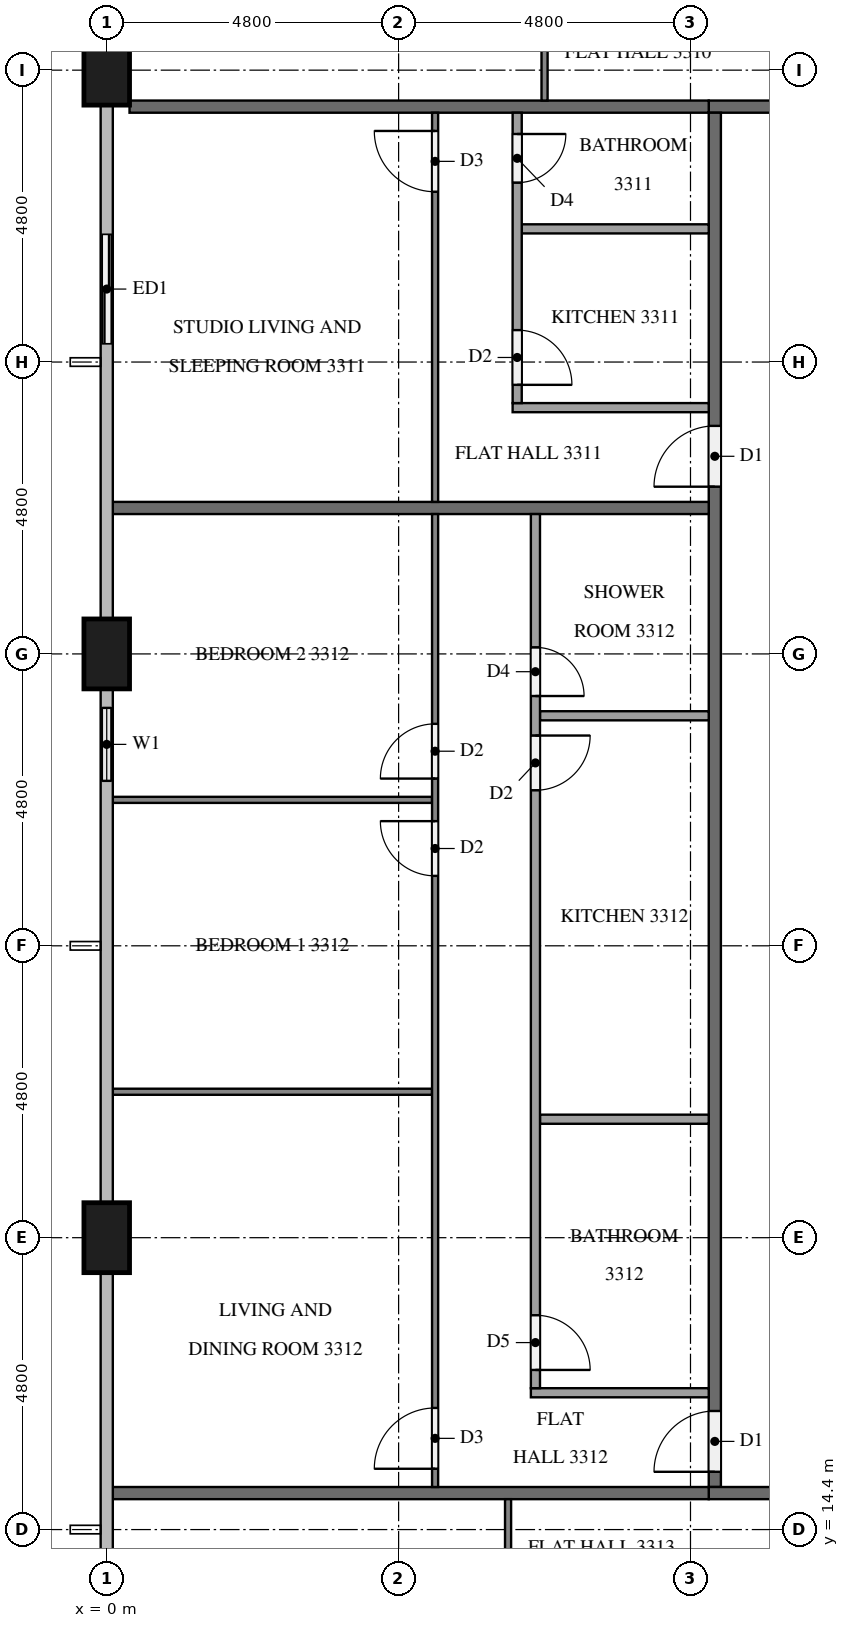
"""IFC4 building model, lengths in metres.
Left out: names, types, materials, properties, quantities, classifications, styles, units other than length and angle.
Written with IfcOpenShell. Run it as: python <this file> out.ifc"""

import sys

from ifc_helpers import new_model, si_unit, direction, frame, frame_2d, origin, origin_2d, place, context, subcontext, project, spatial, rectangle, extrude, element, fill, save


model = new_model("IFC4")
c1 = context("Model", 3, precision=1e-05, world=origin(), true_north=direction((0.0, 1.0)))
c2 = subcontext(c1, "Body", "Model", "MODEL_VIEW")
j1 = project(units=[si_unit("LENGTHUNIT", "METRE"), si_unit("PLANEANGLEUNIT", "RADIAN")], contexts=[c1])
p1 = place(None, origin())
s1 = spatial("IfcSite", under=j1, at=p1, CompositionType="ELEMENT")
p2 = place(p1, origin())
s2 = spatial("IfcBuilding", under=s1, at=p2, CompositionType="ELEMENT")
p3 = place(p2, frame((0.0, 0.0, 129.6)))
s3 = spatial("IfcBuildingStorey", under=s2, at=p3, CompositionType="ELEMENT", Elevation=129.6)
for number, where, z_axis, x_axis in (
    (1, (0.0, 38.4, 0.0), (0.0, 0.0, 1.0), (0.0, 1.0, 0.0)),
    (2, (0.0, 28.8, 0.0), (0.0, 0.0, 1.0), (0.0, 1.0, 0.0)),
    (3, (0.0, 19.2, 0.0), (0.0, 0.0, 1.0), (0.0, 1.0, 0.0)),
):
    element("IfcColumn", number, at=place(p3, frame(where, z_axis=z_axis, x_axis=x_axis)), inside=s3, PredefinedType="COLUMN", context=c2, shape_type="SweptSolid", body=[
        extrude(rectangle(XDim=1.15, YDim=0.75, at=origin_2d()), origin(), (0.0, 0.0, 1.0), 3.2),
    ])
p4 = place(p3, frame((0.0, 36.0, 0.0), z_axis=(0.0, 0.0, 1.0), x_axis=(0.0, -1.0, 0.0)))
e4 = element("IfcWall", 4, at=p4, inside=s3, PredefinedType="SOLIDWALL", context=c2, shape_type="SweptSolid", body=[
    extrude(rectangle(XDim=2.4, YDim=0.15, at=frame_2d((1.2, 0.0))), origin(), (0.0, 0.0, 1.0), 3.2),
])
p5 = place(p4, frame((0.3, 0.0, 0.0)))
e5 = element("IfcOpeningElement", 5, at=p5, cuts=e4, PredefinedType="OPENING", context=c2, shape_type="SweptSolid", body=[
    extrude(rectangle(XDim=1.8, YDim=2.4, at=frame_2d((0.9, 1.2))), frame((0.0, 0.085, 0.0), z_axis=(0.0, -1.0, 0.0), x_axis=(1.0, 0.0, 0.0)), (0.0, 0.0, 1.0), 0.17),
])
p6 = place(p3, frame((0.0, 28.225, 0.0), z_axis=(0.0, 0.0, 1.0), x_axis=(0.0, -1.0, 0.0)))
e6 = element("IfcWall", 6, at=p6, inside=s3, PredefinedType="SOLIDWALL", context=c2, shape_type="SweptSolid", body=[
    extrude(rectangle(XDim=1.825, YDim=0.15, at=frame_2d((0.913, 0.0))), origin(), (0.0, 0.0, 1.0), 3.2),
])
p7 = place(p6, frame((0.312, 0.0, 0.9)))
e7 = element("IfcOpeningElement", 7, at=p7, cuts=e6, PredefinedType="OPENING", context=c2, shape_type="SweptSolid", body=[
    extrude(rectangle(XDim=1.2, YDim=1.4, at=frame_2d((0.6, 0.7))), frame((0.0, 0.085, 0.0), z_axis=(0.0, -1.0, 0.0), x_axis=(1.0, 0.0, 0.0)), (0.0, 0.0, 1.0), 0.17),
])
p8 = place(p3, frame((12.1, 37.8, 0.0), z_axis=(0.0, 0.0, 1.0), x_axis=(-1.0, 0.0, 0.0)))
e8 = element("IfcWall", 8, at=p8, inside=s3, PredefinedType="PARTITIONING", context=c2, shape_type="SweptSolid", body=[
    extrude(rectangle(XDim=2.2, YDim=0.2, at=frame_2d((1.1, 0.0))), origin(), (0.0, 0.0, 1.0), 3.2),
])
p9 = place(p3, frame((10.0, 15.1, 0.0), z_axis=(0.0, 0.0, 1.0), x_axis=(0.0, 1.0, 0.0)))
e9 = element("IfcWall", 9, at=p9, inside=s3, PredefinedType="PARTITIONING", context=c2, shape_type="SweptSolid", body=[
    extrude(rectangle(XDim=22.6, YDim=0.2, at=frame_2d((11.3, 0.0))), origin(), (0.0, 0.0, 1.0), 3.2),
])
p10 = place(p9, frame((16.45, 0.0, 0.0)))
e10 = element("IfcOpeningElement", 10, at=p10, cuts=e9, PredefinedType="OPENING", context=c2, shape_type="SweptSolid", body=[
    extrude(rectangle(XDim=1.0, YDim=2.1, at=frame_2d((0.5, 1.05))), frame((0.0, 0.11, 0.0), z_axis=(0.0, -1.0, 0.0), x_axis=(1.0, 0.0, 0.0)), (0.0, 0.0, 1.0), 0.22),
])
p11 = place(p9, frame((0.25, 0.0, 0.0)))
e11 = element("IfcOpeningElement", 11, at=p11, cuts=e9, PredefinedType="OPENING", context=c2, shape_type="SweptSolid", body=[
    extrude(rectangle(XDim=1.0, YDim=2.1, at=frame_2d((0.5, 1.05))), frame((0.0, 0.11, 0.0), z_axis=(0.0, -1.0, 0.0), x_axis=(1.0, 0.0, 0.0)), (0.0, 0.0, 1.0), 0.22),
])
p12 = place(p3, frame((9.9, 15.0, 0.0), z_axis=(0.0, 0.0, 1.0), x_axis=(1.0, 0.0, 0.0)))
e12 = element("IfcWall", 12, at=p12, inside=s3, PredefinedType="PARTITIONING", context=c2, shape_type="SweptSolid", body=[
    extrude(rectangle(XDim=2.2, YDim=0.2, at=frame_2d((1.1, 0.0))), origin(), (0.0, 0.0, 1.0), 3.2),
])
p13 = place(p3, frame((0.375, 37.8, 0.0), z_axis=(0.0, 0.0, 1.0), x_axis=(1.0, 0.0, 0.0)))
e13 = element("IfcWall", 13, at=p13, inside=s3, PredefinedType="PARTITIONING", context=c2, shape_type="SweptSolid", body=[
    extrude(rectangle(XDim=9.525, YDim=0.2, at=frame_2d((4.762, 0.0))), origin(), (0.0, 0.0, 1.0), 3.2),
])
for number, where, z_axis, x_axis in (
    (14, (0.1, 31.2, 0.0), (0.0, 0.0, 1.0), (1.0, 0.0, 0.0)),
    (15, (0.1, 15.0, 0.0), (0.0, 0.0, 1.0), (1.0, 0.0, 0.0)),
):
    element("IfcWall", number, at=place(p3, frame(where, z_axis=z_axis, x_axis=x_axis)), inside=s3, PredefinedType="PARTITIONING", context=c2, shape_type="SweptSolid", body=[
        extrude(rectangle(XDim=9.8, YDim=0.2, at=frame_2d((4.9, 0.0))), origin(), (0.0, 0.0, 1.0), 3.2),
    ])
p14 = place(p3, frame((7.2, 37.9, 0.0), z_axis=(0.0, 0.0, 1.0), x_axis=(0.0, 1.0, 0.0)))
e16 = element("IfcWall", 16, at=p14, inside=s3, PredefinedType="PARTITIONING", context=c2, shape_type="SweptSolid", body=[
    extrude(rectangle(XDim=14.8, YDim=0.1, at=frame_2d((7.4, 0.0))), origin(), (0.0, 0.0, 1.0), 3.2),
])
p15 = place(p14, frame((4.05, 0.0, 0.0)))
e17 = element("IfcOpeningElement", 17, at=p15, cuts=e16, PredefinedType="OPENING", context=c2, shape_type="SweptSolid", body=[
    extrude(rectangle(XDim=0.9, YDim=2.1, at=frame_2d((0.45, 1.05))), frame((0.0, 0.06, 0.0), z_axis=(0.0, -1.0, 0.0), x_axis=(1.0, 0.0, 0.0)), (0.0, 0.0, 1.0), 0.12),
])
p16 = place(p14, frame((5.65, 0.0, 0.0)))
e18 = element("IfcOpeningElement", 18, at=p16, cuts=e16, PredefinedType="OPENING", context=c2, shape_type="SweptSolid", body=[
    extrude(rectangle(XDim=0.9, YDim=2.1, at=frame_2d((0.45, 1.05))), frame((0.0, 0.06, 0.0), z_axis=(0.0, -1.0, 0.0), x_axis=(1.0, 0.0, 0.0)), (0.0, 0.0, 1.0), 0.12),
])
p17 = place(p14, frame((13.5, 0.0, 0.0)))
e19 = element("IfcOpeningElement", 19, at=p17, cuts=e16, PredefinedType="OPENING", context=c2, shape_type="SweptSolid", body=[
    extrude(rectangle(XDim=1.0, YDim=2.1, at=frame_2d((0.5, 1.05))), frame((0.0, 0.06, 0.0), z_axis=(0.0, -1.0, 0.0), x_axis=(1.0, 0.0, 0.0)), (0.0, 0.0, 1.0), 0.12),
])
p18 = place(p3, frame((5.4, 31.3, 0.0), z_axis=(0.0, 0.0, 1.0), x_axis=(0.0, 1.0, 0.0)))
e20 = element("IfcWall", 20, at=p18, inside=s3, PredefinedType="PARTITIONING", context=c2, shape_type="SweptSolid", body=[
    extrude(rectangle(XDim=6.4, YDim=0.1, at=frame_2d((3.2, 0.0))), origin(), (0.0, 0.0, 1.0), 3.2),
])
p19 = place(p18, frame((5.1, 0.0, 0.0)))
e21 = element("IfcOpeningElement", 21, at=p19, cuts=e20, PredefinedType="OPENING", context=c2, shape_type="SweptSolid", body=[
    extrude(rectangle(XDim=1.0, YDim=2.1, at=frame_2d((0.5, 1.05))), frame((0.0, 0.06, 0.0), z_axis=(0.0, -1.0, 0.0), x_axis=(1.0, 0.0, 0.0)), (0.0, 0.0, 1.0), 0.12),
])
p20 = place(p3, frame((9.9, 35.79, 0.0), z_axis=(0.0, 0.0, 1.0), x_axis=(-1.0, 0.0, 0.0)))
e22 = element("IfcWall", 22, at=p20, inside=s3, PredefinedType="PARTITIONING", context=c2, shape_type="SweptSolid", body=[
    extrude(rectangle(XDim=3.075, YDim=0.15, at=frame_2d((1.538, 0.0))), origin(), (0.0, 0.0, 1.0), 3.2),
])
p21 = place(p3, frame((9.9, 32.85, 0.0), z_axis=(0.0, 0.0, 1.0), x_axis=(-1.0, 0.0, 0.0)))
e23 = element("IfcWall", 23, at=p21, inside=s3, PredefinedType="PARTITIONING", context=c2, shape_type="SweptSolid", body=[
    extrude(rectangle(XDim=3.225, YDim=0.15, at=frame_2d((1.612, 0.0))), origin(), (0.0, 0.0, 1.0), 3.2),
])
p22 = place(p3, frame((6.75, 37.7, 0.0), z_axis=(0.0, 0.0, 1.0), x_axis=(0.0, -1.0, 0.0)))
e24 = element("IfcWall", 24, at=p22, inside=s3, PredefinedType="PARTITIONING", context=c2, shape_type="SweptSolid", body=[
    extrude(rectangle(XDim=4.775, YDim=0.15, at=frame_2d((2.387, 0.0))), origin(), (0.0, 0.0, 1.0), 3.2),
])
p23 = place(p22, frame((3.575, 0.0, 0.0)))
e25 = element("IfcOpeningElement", 25, at=p23, cuts=e24, PredefinedType="OPENING", context=c2, shape_type="SweptSolid", body=[
    extrude(rectangle(XDim=0.9, YDim=2.1, at=frame_2d((0.45, 1.05))), frame((0.0, 0.085, 0.0), z_axis=(0.0, -1.0, 0.0), x_axis=(1.0, 0.0, 0.0)), (0.0, 0.0, 1.0), 0.17),
])
p24 = place(p22, frame((0.35, 0.0, 0.0)))
e26 = element("IfcOpeningElement", 26, at=p24, cuts=e24, PredefinedType="OPENING", context=c2, shape_type="SweptSolid", body=[
    extrude(rectangle(XDim=0.8, YDim=2.1, at=frame_2d((0.4, 1.05))), frame((0.0, 0.085, 0.0), z_axis=(0.0, -1.0, 0.0), x_axis=(1.0, 0.0, 0.0)), (0.0, 0.0, 1.0), 0.17),
])
for number, where, z_axis, x_axis in (
    (27, (5.35, 21.6, 0.0), (0.0, 0.0, 1.0), (-1.0, 0.0, 0.0)),
    (28, (5.35, 26.4, 0.0), (0.0, 0.0, 1.0), (-1.0, 0.0, 0.0)),
):
    element("IfcWall", number, at=place(p3, frame(where, z_axis=z_axis, x_axis=x_axis)), inside=s3, PredefinedType="PARTITIONING", context=c2, shape_type="SweptSolid", body=[
        extrude(rectangle(XDim=5.25, YDim=0.1, at=frame_2d((2.625, 0.0))), origin(), (0.0, 0.0, 1.0), 3.2),
    ])
p25 = place(p3, frame((5.4, 15.1, 0.0), z_axis=(0.0, 0.0, 1.0), x_axis=(0.0, 1.0, 0.0)))
e29 = element("IfcWall", 29, at=p25, inside=s3, PredefinedType="PARTITIONING", context=c2, shape_type="SweptSolid", body=[
    extrude(rectangle(XDim=16.0, YDim=0.1, at=frame_2d((8.0, 0.0))), origin(), (0.0, 0.0, 1.0), 3.2),
])
p26 = place(p25, frame((0.3, 0.0, 0.0)))
e30 = element("IfcOpeningElement", 30, at=p26, cuts=e29, PredefinedType="OPENING", context=c2, shape_type="SweptSolid", body=[
    extrude(rectangle(XDim=1.0, YDim=2.1, at=frame_2d((0.5, 1.05))), frame((0.0, 0.06, 0.0), z_axis=(0.0, -1.0, 0.0), x_axis=(1.0, 0.0, 0.0)), (0.0, 0.0, 1.0), 0.12),
])
p27 = place(p25, frame((10.05, 0.0, 0.0)))
e31 = element("IfcOpeningElement", 31, at=p27, cuts=e29, PredefinedType="OPENING", context=c2, shape_type="SweptSolid", body=[
    extrude(rectangle(XDim=0.9, YDim=2.1, at=frame_2d((0.45, 1.05))), frame((0.0, 0.06, 0.0), z_axis=(0.0, -1.0, 0.0), x_axis=(1.0, 0.0, 0.0)), (0.0, 0.0, 1.0), 0.12),
])
p28 = place(p25, frame((11.65, 0.0, 0.0)))
e32 = element("IfcOpeningElement", 32, at=p28, cuts=e29, PredefinedType="OPENING", context=c2, shape_type="SweptSolid", body=[
    extrude(rectangle(XDim=0.9, YDim=2.1, at=frame_2d((0.45, 1.05))), frame((0.0, 0.06, 0.0), z_axis=(0.0, -1.0, 0.0), x_axis=(1.0, 0.0, 0.0)), (0.0, 0.0, 1.0), 0.12),
])
for number, where, z_axis, x_axis in (
    (33, (9.9, 21.148, 0.0), (0.0, 0.0, 1.0), (-1.0, 0.0, 0.0)),
    (34, (9.9, 27.783, 0.0), (0.0, 0.0, 1.0), (-1.0, 0.0, 0.0)),
):
    element("IfcWall", number, at=place(p3, frame(where, z_axis=z_axis, x_axis=x_axis)), inside=s3, PredefinedType="PARTITIONING", context=c2, shape_type="SweptSolid", body=[
        extrude(rectangle(XDim=2.775, YDim=0.15, at=frame_2d((1.387, 0.0))), origin(), (0.0, 0.0, 1.0), 3.2),
    ])
p29 = place(p3, frame((9.9, 16.65, 0.0), z_axis=(0.0, 0.0, 1.0), x_axis=(-1.0, 0.0, 0.0)))
e35 = element("IfcWall", 35, at=p29, inside=s3, PredefinedType="PARTITIONING", context=c2, shape_type="SweptSolid", body=[
    extrude(rectangle(XDim=2.925, YDim=0.15, at=frame_2d((1.462, 0.0))), origin(), (0.0, 0.0, 1.0), 3.2),
])
p30 = place(p3, frame((7.05, 31.1, 0.0), z_axis=(0.0, 0.0, 1.0), x_axis=(0.0, -1.0, 0.0)))
e36 = element("IfcWall", 36, at=p30, inside=s3, PredefinedType="PARTITIONING", context=c2, shape_type="SweptSolid", body=[
    extrude(rectangle(XDim=14.375, YDim=0.15, at=frame_2d((7.188, 0.0))), origin(), (0.0, 0.0, 1.0), 3.2),
])
p31 = place(p30, frame((13.175, 0.0, 0.0)))
e37 = element("IfcOpeningElement", 37, at=p31, cuts=e36, PredefinedType="OPENING", context=c2, shape_type="SweptSolid", body=[
    extrude(rectangle(XDim=0.9, YDim=2.1, at=frame_2d((0.45, 1.05))), frame((0.0, 0.085, 0.0), z_axis=(0.0, -1.0, 0.0), x_axis=(1.0, 0.0, 0.0)), (0.0, 0.0, 1.0), 0.17),
])
p32 = place(p30, frame((3.642, 0.0, 0.0)))
e38 = element("IfcOpeningElement", 38, at=p32, cuts=e36, PredefinedType="OPENING", context=c2, shape_type="SweptSolid", body=[
    extrude(rectangle(XDim=0.9, YDim=2.1, at=frame_2d((0.45, 1.05))), frame((0.0, 0.085, 0.0), z_axis=(0.0, -1.0, 0.0), x_axis=(1.0, 0.0, 0.0)), (0.0, 0.0, 1.0), 0.17),
])
p33 = place(p30, frame((2.192, 0.0, 0.0)))
e39 = element("IfcOpeningElement", 39, at=p33, cuts=e36, PredefinedType="OPENING", context=c2, shape_type="SweptSolid", body=[
    extrude(rectangle(XDim=0.8, YDim=2.1, at=frame_2d((0.4, 1.05))), frame((0.0, 0.085, 0.0), z_axis=(0.0, -1.0, 0.0), x_axis=(1.0, 0.0, 0.0)), (0.0, 0.0, 1.0), 0.17),
])
p34 = place(p3, frame((6.6, 4.9, 0.0), z_axis=(0.0, 0.0, 1.0), x_axis=(0.0, 1.0, 0.0)))
e40 = element("IfcWall", 40, at=p34, inside=s3, PredefinedType="PARTITIONING", context=c2, shape_type="SweptSolid", body=[
    extrude(rectangle(XDim=10.0, YDim=0.1, at=frame_2d((5.0, 0.0))), origin(), (0.0, 0.0, 1.0), 3.2),
])
p35 = place(p34, frame((5.05, 0.0, 0.0)))
e41 = element("IfcOpeningElement", 41, at=p35, cuts=e40, PredefinedType="OPENING", context=c2, shape_type="SweptSolid", body=[
    extrude(rectangle(XDim=1.0, YDim=2.1, at=frame_2d((0.5, 1.05))), frame((0.0, 0.06, 0.0), z_axis=(0.0, -1.0, 0.0), x_axis=(1.0, 0.0, 0.0)), (0.0, 0.0, 1.0), 0.12),
])
p36 = place(p34, frame((3.45, 0.0, 0.0)))
e42 = element("IfcOpeningElement", 42, at=p36, cuts=e40, PredefinedType="OPENING", context=c2, shape_type="SweptSolid", body=[
    extrude(rectangle(XDim=0.9, YDim=2.1, at=frame_2d((0.45, 1.05))), frame((0.0, 0.06, 0.0), z_axis=(0.0, -1.0, 0.0), x_axis=(1.0, 0.0, 0.0)), (0.0, 0.0, 1.0), 0.12),
])
p37 = place(p5, origin())
e43 = element("IfcDoor", 43, at=p37, inside=s3, OperationType="SLIDING_TO_LEFT", PredefinedType="DOOR", context=c2, shape_type="SweptSolid", body=[
    extrude(rectangle(XDim=1.8, YDim=2.4, at=frame_2d((0.9, 1.2))), frame((0.0, 0.025, 0.0), z_axis=(0.0, -1.0, 0.0), x_axis=(1.0, 0.0, 0.0)), (0.0, 0.0, 1.0), 0.05),
])
fill(e5, e43)
p38 = place(p7, origin())
e44 = element("IfcWindow", 44, at=p38, inside=s3, PartitioningType="SINGLE_PANEL", PredefinedType="WINDOW", context=c2, shape_type="SweptSolid", body=[
    extrude(rectangle(XDim=1.2, YDim=1.4, at=frame_2d((0.6, 0.7))), frame((0.0, 0.03, 0.0), z_axis=(0.0, -1.0, 0.0), x_axis=(1.0, 0.0, 0.0)), (0.0, 0.0, 1.0), 0.06),
])
fill(e7, e44)
p39 = place(p10, origin())
e45 = element("IfcDoor", 45, at=p39, inside=s3, OperationType="SINGLE_SWING_LEFT", PredefinedType="DOOR", context=c2, shape_type="SweptSolid", body=[
    extrude(rectangle(XDim=1.0, YDim=2.1, at=frame_2d((0.5, 1.05))), frame((0.0, 0.025, 0.0), z_axis=(0.0, -1.0, 0.0), x_axis=(1.0, 0.0, 0.0)), (0.0, 0.0, 1.0), 0.05),
])
fill(e10, e45)
p40 = place(p11, origin())
e46 = element("IfcDoor", 46, at=p40, inside=s3, OperationType="SINGLE_SWING_LEFT", PredefinedType="DOOR", context=c2, shape_type="SweptSolid", body=[
    extrude(rectangle(XDim=1.0, YDim=2.1, at=frame_2d((0.5, 1.05))), frame((0.0, 0.025, 0.0), z_axis=(0.0, -1.0, 0.0), x_axis=(1.0, 0.0, 0.0)), (0.0, 0.0, 1.0), 0.05),
])
fill(e11, e46)
p41 = place(p19, origin())
e47 = element("IfcDoor", 47, at=p41, inside=s3, OperationType="SINGLE_SWING_RIGHT", PredefinedType="DOOR", context=c2, shape_type="SweptSolid", body=[
    extrude(rectangle(XDim=1.0, YDim=2.1, at=frame_2d((0.5, 1.05))), frame((0.0, 0.025, 0.0), z_axis=(0.0, -1.0, 0.0), x_axis=(1.0, 0.0, 0.0)), (0.0, 0.0, 1.0), 0.05),
])
fill(e21, e47)
p42 = place(p23, origin())
e48 = element("IfcDoor", 48, at=p42, inside=s3, OperationType="SINGLE_SWING_RIGHT", PredefinedType="DOOR", context=c2, shape_type="SweptSolid", body=[
    extrude(rectangle(XDim=0.9, YDim=2.1, at=frame_2d((0.45, 1.05))), frame((0.0, 0.025, 0.0), z_axis=(0.0, -1.0, 0.0), x_axis=(1.0, 0.0, 0.0)), (0.0, 0.0, 1.0), 0.05),
])
fill(e25, e48)
p43 = place(p24, origin())
e49 = element("IfcDoor", 49, at=p43, inside=s3, OperationType="SINGLE_SWING_LEFT", PredefinedType="DOOR", context=c2, shape_type="SweptSolid", body=[
    extrude(rectangle(XDim=0.8, YDim=2.1, at=frame_2d((0.4, 1.05))), frame((0.0, 0.025, 0.0), z_axis=(0.0, -1.0, 0.0), x_axis=(1.0, 0.0, 0.0)), (0.0, 0.0, 1.0), 0.05),
])
fill(e26, e49)
p44 = place(p26, origin())
e50 = element("IfcDoor", 50, at=p44, inside=s3, OperationType="SINGLE_SWING_LEFT", PredefinedType="DOOR", context=c2, shape_type="SweptSolid", body=[
    extrude(rectangle(XDim=1.0, YDim=2.1, at=frame_2d((0.5, 1.05))), frame((0.0, 0.025, 0.0), z_axis=(0.0, -1.0, 0.0), x_axis=(1.0, 0.0, 0.0)), (0.0, 0.0, 1.0), 0.05),
])
fill(e30, e50)
p45 = place(p27, origin())
e51 = element("IfcDoor", 51, at=p45, inside=s3, OperationType="SINGLE_SWING_RIGHT", PredefinedType="DOOR", context=c2, shape_type="SweptSolid", body=[
    extrude(rectangle(XDim=0.9, YDim=2.1, at=frame_2d((0.45, 1.05))), frame((0.0, 0.025, 0.0), z_axis=(0.0, -1.0, 0.0), x_axis=(1.0, 0.0, 0.0)), (0.0, 0.0, 1.0), 0.05),
])
fill(e31, e51)
p46 = place(p28, origin())
e52 = element("IfcDoor", 52, at=p46, inside=s3, OperationType="SINGLE_SWING_LEFT", PredefinedType="DOOR", context=c2, shape_type="SweptSolid", body=[
    extrude(rectangle(XDim=0.9, YDim=2.1, at=frame_2d((0.45, 1.05))), frame((0.0, 0.025, 0.0), z_axis=(0.0, -1.0, 0.0), x_axis=(1.0, 0.0, 0.0)), (0.0, 0.0, 1.0), 0.05),
])
fill(e32, e52)
p47 = place(p31, origin())
e53 = element("IfcDoor", 53, at=p47, inside=s3, OperationType="SINGLE_SWING_RIGHT", PredefinedType="DOOR", context=c2, shape_type="SweptSolid", body=[
    extrude(rectangle(XDim=0.9, YDim=2.1, at=frame_2d((0.45, 1.05))), frame((0.0, 0.025, 0.0), z_axis=(0.0, -1.0, 0.0), x_axis=(1.0, 0.0, 0.0)), (0.0, 0.0, 1.0), 0.05),
])
fill(e37, e53)
p48 = place(p32, origin())
e54 = element("IfcDoor", 54, at=p48, inside=s3, OperationType="SINGLE_SWING_LEFT", PredefinedType="DOOR", context=c2, shape_type="SweptSolid", body=[
    extrude(rectangle(XDim=0.9, YDim=2.1, at=frame_2d((0.45, 1.05))), frame((0.0, 0.025, 0.0), z_axis=(0.0, -1.0, 0.0), x_axis=(1.0, 0.0, 0.0)), (0.0, 0.0, 1.0), 0.05),
])
fill(e38, e54)
p49 = place(p33, origin())
e55 = element("IfcDoor", 55, at=p49, inside=s3, OperationType="SINGLE_SWING_RIGHT", PredefinedType="DOOR", context=c2, shape_type="SweptSolid", body=[
    extrude(rectangle(XDim=0.8, YDim=2.1, at=frame_2d((0.4, 1.05))), frame((0.0, 0.025, 0.0), z_axis=(0.0, -1.0, 0.0), x_axis=(1.0, 0.0, 0.0)), (0.0, 0.0, 1.0), 0.05),
])
fill(e39, e55)
save(model, sys.argv[1])
